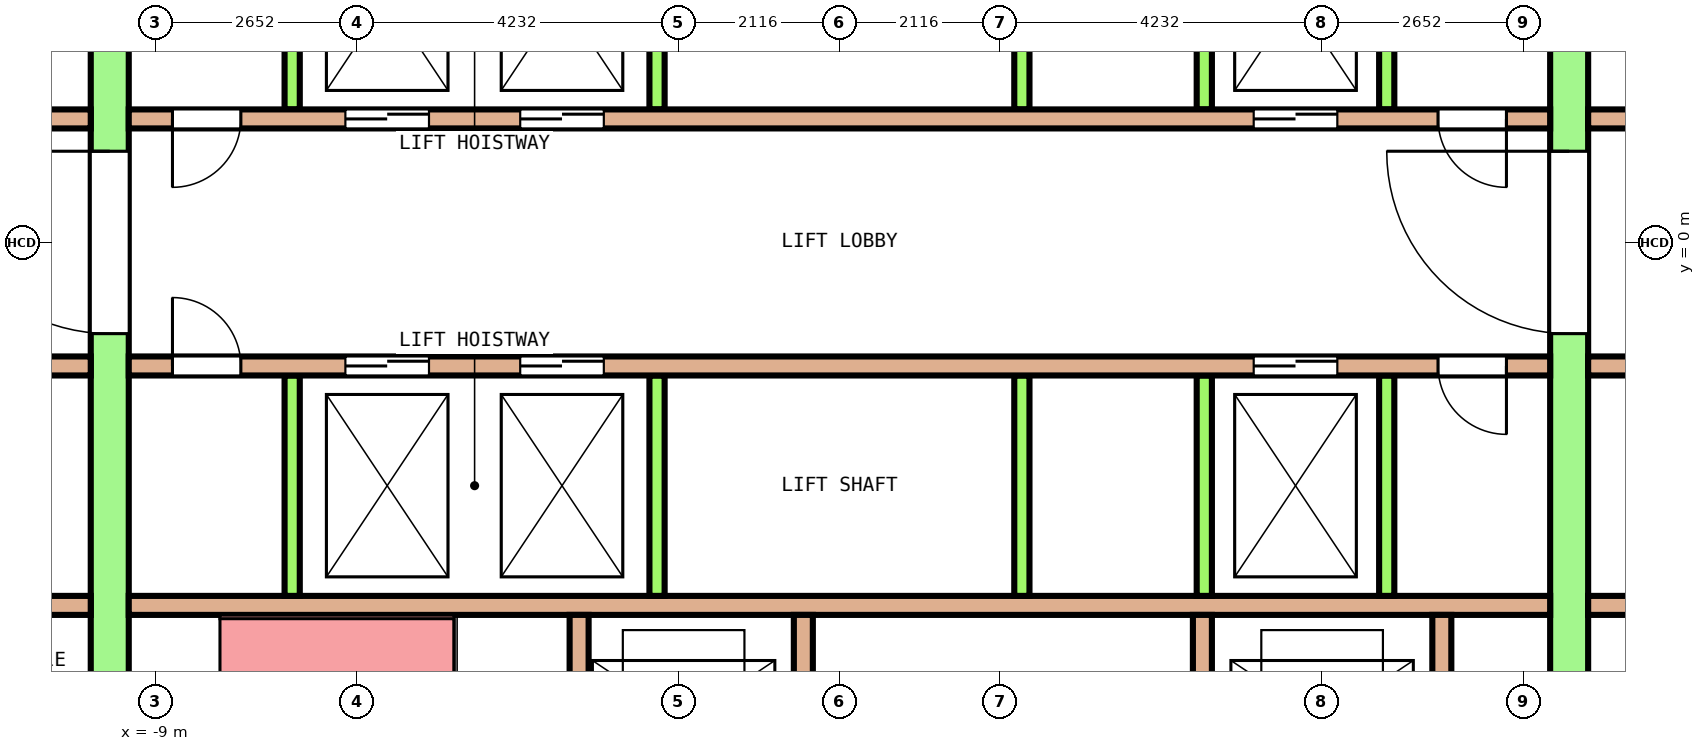
"""IFC4 building model, lengths in metres.
Left out: names, types, materials, properties, quantities, classifications, styles, units other than length and angle.
Written with IfcOpenShell. Run it as: python <this file> out.ifc"""

import sys

from ifc_helpers import new_model, si_unit, direction, frame, frame_2d, origin, place, context, subcontext, project, spatial, rectangle, extrude, element, fill, save


model = new_model("IFC4")
c1 = context("Model", 3, precision=1e-05, world=origin(), true_north=direction((0.0, 1.0)))
c2 = subcontext(c1, "Body", "Model", "MODEL_VIEW")
j1 = project(units=[si_unit("LENGTHUNIT", "METRE"), si_unit("PLANEANGLEUNIT", "RADIAN")], contexts=[c1])
p1 = place(None, origin())
s1 = spatial("IfcSite", under=j1, at=p1, CompositionType="ELEMENT")
p2 = place(p1, origin())
s2 = spatial("IfcBuilding", under=s1, at=p2, CompositionType="ELEMENT")
p3 = place(p2, frame((0.0, 0.0, 135.2)))
s3 = spatial("IfcBuildingStorey", under=s2, at=p3, CompositionType="ELEMENT", Elevation=135.2)
p4 = place(p3, frame((-9.6, -7.7, 0.0), z_axis=(0.0, 0.0, 1.0), x_axis=(0.0, 1.0, 0.0)))
e1 = element("IfcWall", 1, at=p4, inside=s3, PredefinedType="SHEAR", context=c2, shape_type="SweptSolid", body=[
    extrude(rectangle(XDim=15.4, YDim=0.5, at=frame_2d((7.7, 0.0))), origin(), (0.0, 0.0, 1.0), 4.1),
])
p5 = place(p4, frame((6.5, 0.0, 0.0)))
e2 = element("IfcOpeningElement", 2, at=p5, cuts=e1, PredefinedType="OPENING", context=c2, shape_type="SweptSolid", body=[
    extrude(rectangle(XDim=2.4, YDim=2.1, at=frame_2d((1.2, 1.05))), frame((0.0, 0.26, 0.0), z_axis=(0.0, -1.0, 0.0), x_axis=(1.0, 0.0, 0.0)), (0.0, 0.0, 1.0), 0.52),
])
p6 = place(p4, frame((13.4, 0.0, 0.0)))
e3 = element("IfcOpeningElement", 3, at=p6, cuts=e1, PredefinedType="OPENING", context=c2, shape_type="SweptSolid", body=[
    extrude(rectangle(XDim=1.2, YDim=2.1, at=frame_2d((0.6, 1.05))), frame((0.0, 0.26, 0.0), z_axis=(0.0, -1.0, 0.0), x_axis=(1.0, 0.0, 0.0)), (0.0, 0.0, 1.0), 0.52),
])
p7 = place(p4, frame((0.8, 0.0, 0.0)))
e4 = element("IfcOpeningElement", 4, at=p7, cuts=e1, PredefinedType="OPENING", context=c2, shape_type="SweptSolid", body=[
    extrude(rectangle(XDim=1.2, YDim=2.1, at=frame_2d((0.6, 1.05))), frame((0.0, 0.26, 0.0), z_axis=(0.0, -1.0, 0.0), x_axis=(1.0, 0.0, 0.0)), (0.0, 0.0, 1.0), 0.52),
])
p8 = place(p3, frame((9.6, -7.7, 0.0), z_axis=(0.0, 0.0, 1.0), x_axis=(0.0, 1.0, 0.0)))
e5 = element("IfcWall", 5, at=p8, inside=s3, PredefinedType="SHEAR", context=c2, shape_type="SweptSolid", body=[
    extrude(rectangle(XDim=15.4, YDim=0.5, at=frame_2d((7.7, 0.0))), origin(), (0.0, 0.0, 1.0), 4.1),
])
p9 = place(p8, frame((6.5, 0.0, 0.0)))
e6 = element("IfcOpeningElement", 6, at=p9, cuts=e5, PredefinedType="OPENING", context=c2, shape_type="SweptSolid", body=[
    extrude(rectangle(XDim=2.4, YDim=2.1, at=frame_2d((1.2, 1.05))), frame((0.0, 0.26, 0.0), z_axis=(0.0, -1.0, 0.0), x_axis=(1.0, 0.0, 0.0)), (0.0, 0.0, 1.0), 0.52),
])
p10 = place(p8, frame((13.4, 0.0, 0.0)))
e7 = element("IfcOpeningElement", 7, at=p10, cuts=e5, PredefinedType="OPENING", context=c2, shape_type="SweptSolid", body=[
    extrude(rectangle(XDim=1.2, YDim=2.1, at=frame_2d((0.6, 1.05))), frame((0.0, 0.26, 0.0), z_axis=(0.0, -1.0, 0.0), x_axis=(1.0, 0.0, 0.0)), (0.0, 0.0, 1.0), 0.52),
])
p11 = place(p8, frame((0.9, 0.0, 0.0)))
e8 = element("IfcOpeningElement", 8, at=p11, cuts=e5, PredefinedType="OPENING", context=c2, shape_type="SweptSolid", body=[
    extrude(rectangle(XDim=1.0, YDim=2.1, at=frame_2d((0.5, 1.05))), frame((0.0, 0.26, 0.0), z_axis=(0.0, -1.0, 0.0), x_axis=(1.0, 0.0, 0.0)), (0.0, 0.0, 1.0), 0.52),
])
p12 = place(p3, frame((-12.8, 1.625, 0.0), z_axis=(0.0, 0.0, 1.0), x_axis=(1.0, 0.0, 0.0)))
e9 = element("IfcWall", 9, at=p12, inside=s3, PredefinedType="SOLIDWALL", context=c2, shape_type="SweptSolid", body=[
    extrude(rectangle(XDim=2.95, YDim=0.25, at=frame_2d((1.475, 0.0))), origin(), (0.0, 0.0, 1.0), 4.1),
])
p13 = place(p12, frame((1.025, 0.0, 0.0)))
e10 = element("IfcOpeningElement", 10, at=p13, cuts=e9, PredefinedType="OPENING", context=c2, shape_type="SweptSolid", body=[
    extrude(rectangle(XDim=0.9, YDim=2.1, at=frame_2d((0.45, 1.05))), frame((0.0, 0.135, 0.0), z_axis=(0.0, -1.0, 0.0), x_axis=(1.0, 0.0, 0.0)), (0.0, 0.0, 1.0), 0.27),
])
p14 = place(p3, frame((-9.35, 1.625, 0.0), z_axis=(0.0, 0.0, 1.0), x_axis=(1.0, 0.0, 0.0)))
e11 = element("IfcWall", 11, at=p14, inside=s3, PredefinedType="SOLIDWALL", context=c2, shape_type="SweptSolid", body=[
    extrude(rectangle(XDim=18.7, YDim=0.25, at=frame_2d((9.35, 0.0))), origin(), (0.0, 0.0, 1.0), 4.1),
])
p15 = place(p14, frame((2.85, 0.0, 0.0)))
e12 = element("IfcOpeningElement", 12, at=p15, cuts=e11, PredefinedType="OPENING", context=c2, shape_type="SweptSolid", body=[
    extrude(rectangle(XDim=1.1, YDim=2.1, at=frame_2d((0.55, 1.05))), frame((0.0, 0.135, 0.0), z_axis=(0.0, -1.0, 0.0), x_axis=(1.0, 0.0, 0.0)), (0.0, 0.0, 1.0), 0.27),
])
p16 = place(p14, frame((5.15, 0.0, 0.0)))
e13 = element("IfcOpeningElement", 13, at=p16, cuts=e11, PredefinedType="OPENING", context=c2, shape_type="SweptSolid", body=[
    extrude(rectangle(XDim=1.1, YDim=2.1, at=frame_2d((0.55, 1.05))), frame((0.0, 0.135, 0.0), z_axis=(0.0, -1.0, 0.0), x_axis=(1.0, 0.0, 0.0)), (0.0, 0.0, 1.0), 0.27),
])
p17 = place(p14, frame((14.8, 0.0, 0.0)))
e14 = element("IfcOpeningElement", 14, at=p17, cuts=e11, PredefinedType="OPENING", context=c2, shape_type="SweptSolid", body=[
    extrude(rectangle(XDim=1.1, YDim=2.1, at=frame_2d((0.55, 1.05))), frame((0.0, 0.135, 0.0), z_axis=(0.0, -1.0, 0.0), x_axis=(1.0, 0.0, 0.0)), (0.0, 0.0, 1.0), 0.27),
])
p18 = place(p14, frame((0.575, 0.0, 0.0)))
e15 = element("IfcOpeningElement", 15, at=p18, cuts=e11, PredefinedType="OPENING", context=c2, shape_type="SweptSolid", body=[
    extrude(rectangle(XDim=0.9, YDim=2.1, at=frame_2d((0.45, 1.05))), frame((0.0, 0.135, 0.0), z_axis=(0.0, -1.0, 0.0), x_axis=(1.0, 0.0, 0.0)), (0.0, 0.0, 1.0), 0.27),
])
p19 = place(p14, frame((17.225, 0.0, 0.0)))
e16 = element("IfcOpeningElement", 16, at=p19, cuts=e11, PredefinedType="OPENING", context=c2, shape_type="SweptSolid", body=[
    extrude(rectangle(XDim=0.9, YDim=2.1, at=frame_2d((0.45, 1.05))), frame((0.0, 0.135, 0.0), z_axis=(0.0, -1.0, 0.0), x_axis=(1.0, 0.0, 0.0)), (0.0, 0.0, 1.0), 0.27),
])
p20 = place(p3, frame((9.85, 1.625, 0.0), z_axis=(0.0, 0.0, 1.0), x_axis=(1.0, 0.0, 0.0)))
e17 = element("IfcWall", 17, at=p20, inside=s3, PredefinedType="SOLIDWALL", context=c2, shape_type="SweptSolid", body=[
    extrude(rectangle(XDim=2.95, YDim=0.25, at=frame_2d((1.475, 0.0))), origin(), (0.0, 0.0, 1.0), 4.1),
])
p21 = place(p20, frame((1.025, 0.0, 0.0)))
e18 = element("IfcOpeningElement", 18, at=p21, cuts=e17, PredefinedType="OPENING", context=c2, shape_type="SweptSolid", body=[
    extrude(rectangle(XDim=0.9, YDim=2.1, at=frame_2d((0.45, 1.05))), frame((0.0, 0.135, 0.0), z_axis=(0.0, -1.0, 0.0), x_axis=(1.0, 0.0, 0.0)), (0.0, 0.0, 1.0), 0.27),
])
for number, where, z_axis, x_axis in (
    (19, (-7.2, 1.75, 0.0), (0.0, 0.0, 1.0), (0.0, 1.0, 0.0)),
    (20, (-2.4, 1.75, 0.0), (0.0, 0.0, 1.0), (0.0, 1.0, 0.0)),
    (21, (2.4, 1.75, 0.0), (0.0, 0.0, 1.0), (0.0, 1.0, 0.0)),
    (22, (4.8, 1.75, 0.0), (0.0, 0.0, 1.0), (0.0, 1.0, 0.0)),
    (23, (7.2, 1.75, 0.0), (0.0, 0.0, 1.0), (0.0, 1.0, 0.0)),
):
    element("IfcWall", number, at=place(p3, frame(where, z_axis=z_axis, x_axis=x_axis)), inside=s3, PredefinedType="SOLIDWALL", context=c2, shape_type="SweptSolid", body=[
        extrude(rectangle(XDim=2.9, YDim=0.2, at=frame_2d((1.45, 0.0))), origin(), (0.0, 0.0, 1.0), 4.1),
    ])
p22 = place(p3, frame((-12.8, -1.625, 0.0), z_axis=(0.0, 0.0, 1.0), x_axis=(1.0, 0.0, 0.0)))
e24 = element("IfcWall", 24, at=p22, inside=s3, PredefinedType="SOLIDWALL", context=c2, shape_type="SweptSolid", body=[
    extrude(rectangle(XDim=2.95, YDim=0.25, at=frame_2d((1.475, 0.0))), origin(), (0.0, 0.0, 1.0), 4.1),
])
p23 = place(p22, frame((1.025, 0.0, 0.0)))
e25 = element("IfcOpeningElement", 25, at=p23, cuts=e24, PredefinedType="OPENING", context=c2, shape_type="SweptSolid", body=[
    extrude(rectangle(XDim=0.9, YDim=2.1, at=frame_2d((0.45, 1.05))), frame((0.0, 0.135, 0.0), z_axis=(0.0, -1.0, 0.0), x_axis=(1.0, 0.0, 0.0)), (0.0, 0.0, 1.0), 0.27),
])
p24 = place(p3, frame((-9.35, -1.625, 0.0), z_axis=(0.0, 0.0, 1.0), x_axis=(1.0, 0.0, 0.0)))
e26 = element("IfcWall", 26, at=p24, inside=s3, PredefinedType="SOLIDWALL", context=c2, shape_type="SweptSolid", body=[
    extrude(rectangle(XDim=18.7, YDim=0.25, at=frame_2d((9.35, 0.0))), origin(), (0.0, 0.0, 1.0), 4.1),
])
p25 = place(p24, frame((2.85, 0.0, 0.0)))
e27 = element("IfcOpeningElement", 27, at=p25, cuts=e26, PredefinedType="OPENING", context=c2, shape_type="SweptSolid", body=[
    extrude(rectangle(XDim=1.1, YDim=2.1, at=frame_2d((0.55, 1.05))), frame((0.0, 0.135, 0.0), z_axis=(0.0, -1.0, 0.0), x_axis=(1.0, 0.0, 0.0)), (0.0, 0.0, 1.0), 0.27),
])
p26 = place(p24, frame((5.15, 0.0, 0.0)))
e28 = element("IfcOpeningElement", 28, at=p26, cuts=e26, PredefinedType="OPENING", context=c2, shape_type="SweptSolid", body=[
    extrude(rectangle(XDim=1.1, YDim=2.1, at=frame_2d((0.55, 1.05))), frame((0.0, 0.135, 0.0), z_axis=(0.0, -1.0, 0.0), x_axis=(1.0, 0.0, 0.0)), (0.0, 0.0, 1.0), 0.27),
])
p27 = place(p24, frame((14.8, 0.0, 0.0)))
e29 = element("IfcOpeningElement", 29, at=p27, cuts=e26, PredefinedType="OPENING", context=c2, shape_type="SweptSolid", body=[
    extrude(rectangle(XDim=1.1, YDim=2.1, at=frame_2d((0.55, 1.05))), frame((0.0, 0.135, 0.0), z_axis=(0.0, -1.0, 0.0), x_axis=(1.0, 0.0, 0.0)), (0.0, 0.0, 1.0), 0.27),
])
p28 = place(p24, frame((0.575, 0.0, 0.0)))
e30 = element("IfcOpeningElement", 30, at=p28, cuts=e26, PredefinedType="OPENING", context=c2, shape_type="SweptSolid", body=[
    extrude(rectangle(XDim=0.9, YDim=2.1, at=frame_2d((0.45, 1.05))), frame((0.0, 0.135, 0.0), z_axis=(0.0, -1.0, 0.0), x_axis=(1.0, 0.0, 0.0)), (0.0, 0.0, 1.0), 0.27),
])
p29 = place(p24, frame((17.225, 0.0, 0.0)))
e31 = element("IfcOpeningElement", 31, at=p29, cuts=e26, PredefinedType="OPENING", context=c2, shape_type="SweptSolid", body=[
    extrude(rectangle(XDim=0.9, YDim=2.1, at=frame_2d((0.45, 1.05))), frame((0.0, 0.135, 0.0), z_axis=(0.0, -1.0, 0.0), x_axis=(1.0, 0.0, 0.0)), (0.0, 0.0, 1.0), 0.27),
])
p30 = place(p3, frame((9.85, -1.625, 0.0), z_axis=(0.0, 0.0, 1.0), x_axis=(1.0, 0.0, 0.0)))
e32 = element("IfcWall", 32, at=p30, inside=s3, PredefinedType="SOLIDWALL", context=c2, shape_type="SweptSolid", body=[
    extrude(rectangle(XDim=2.95, YDim=0.25, at=frame_2d((1.475, 0.0))), origin(), (0.0, 0.0, 1.0), 4.1),
])
p31 = place(p30, frame((1.025, 0.0, 0.0)))
e33 = element("IfcOpeningElement", 33, at=p31, cuts=e32, PredefinedType="OPENING", context=c2, shape_type="SweptSolid", body=[
    extrude(rectangle(XDim=0.9, YDim=2.1, at=frame_2d((0.45, 1.05))), frame((0.0, 0.135, 0.0), z_axis=(0.0, -1.0, 0.0), x_axis=(1.0, 0.0, 0.0)), (0.0, 0.0, 1.0), 0.27),
])
p32 = place(p3, frame((-12.8, -4.775, 0.0), z_axis=(0.0, 0.0, 1.0), x_axis=(1.0, 0.0, 0.0)))
e34 = element("IfcWall", 34, at=p32, inside=s3, PredefinedType="SOLIDWALL", context=c2, shape_type="SweptSolid", body=[
    extrude(rectangle(XDim=2.95, YDim=0.25, at=frame_2d((1.475, 0.0))), origin(), (0.0, 0.0, 1.0), 4.1),
])
p33 = place(p3, frame((-9.35, -4.775, 0.0), z_axis=(0.0, 0.0, 1.0), x_axis=(1.0, 0.0, 0.0)))
e35 = element("IfcWall", 35, at=p33, inside=s3, PredefinedType="SOLIDWALL", context=c2, shape_type="SweptSolid", body=[
    extrude(rectangle(XDim=18.7, YDim=0.25, at=frame_2d((9.35, 0.0))), origin(), (0.0, 0.0, 1.0), 4.1),
])
p34 = place(p3, frame((9.85, -4.775, 0.0), z_axis=(0.0, 0.0, 1.0), x_axis=(1.0, 0.0, 0.0)))
e36 = element("IfcWall", 36, at=p34, inside=s3, PredefinedType="SOLIDWALL", context=c2, shape_type="SweptSolid", body=[
    extrude(rectangle(XDim=2.95, YDim=0.25, at=frame_2d((1.475, 0.0))), origin(), (0.0, 0.0, 1.0), 4.1),
])
for number, where, z_axis, x_axis in (
    (37, (-7.2, -4.65, 0.0), (0.0, 0.0, 1.0), (0.0, 1.0, 0.0)),
    (38, (-2.4, -4.65, 0.0), (0.0, 0.0, 1.0), (0.0, 1.0, 0.0)),
    (39, (2.4, -4.65, 0.0), (0.0, 0.0, 1.0), (0.0, 1.0, 0.0)),
    (40, (4.8, -4.65, 0.0), (0.0, 0.0, 1.0), (0.0, 1.0, 0.0)),
    (41, (7.2, -4.65, 0.0), (0.0, 0.0, 1.0), (0.0, 1.0, 0.0)),
):
    element("IfcWall", number, at=place(p3, frame(where, z_axis=z_axis, x_axis=x_axis)), inside=s3, PredefinedType="SOLIDWALL", context=c2, shape_type="SweptSolid", body=[
        extrude(rectangle(XDim=2.9, YDim=0.2, at=frame_2d((1.45, 0.0))), origin(), (0.0, 0.0, 1.0), 4.1),
    ])
p35 = place(p3, frame((-3.425, -7.7, 0.0), z_axis=(0.0, 0.0, 1.0), x_axis=(0.0, 1.0, 0.0)))
e42 = element("IfcWall", 42, at=p35, inside=s3, PredefinedType="SOLIDWALL", context=c2, shape_type="SweptSolid", body=[
    extrude(rectangle(XDim=2.8, YDim=0.25, at=frame_2d((1.4, 0.0))), origin(), (0.0, 0.0, 1.0), 4.1),
])
p36 = place(p3, frame((-0.475, -7.7, 0.0), z_axis=(0.0, 0.0, 1.0), x_axis=(0.0, 1.0, 0.0)))
e43 = element("IfcWall", 43, at=p36, inside=s3, PredefinedType="SOLIDWALL", context=c2, shape_type="SweptSolid", body=[
    extrude(rectangle(XDim=2.8, YDim=0.25, at=frame_2d((1.4, 0.0))), origin(), (0.0, 0.0, 1.0), 4.1),
])
p37 = place(p36, frame((0.85, 0.0, 0.0)))
e44 = element("IfcOpeningElement", 44, at=p37, cuts=e43, PredefinedType="OPENING", context=c2, shape_type="SweptSolid", body=[
    extrude(rectangle(XDim=1.1, YDim=2.1, at=frame_2d((0.55, 1.05))), frame((0.0, 0.135, 0.0), z_axis=(0.0, -1.0, 0.0), x_axis=(1.0, 0.0, 0.0)), (0.0, 0.0, 1.0), 0.27),
])
p38 = place(p3, frame((4.775, -7.7, 0.0), z_axis=(0.0, 0.0, 1.0), x_axis=(0.0, 1.0, 0.0)))
e45 = element("IfcWall", 45, at=p38, inside=s3, PredefinedType="SOLIDWALL", context=c2, shape_type="SweptSolid", body=[
    extrude(rectangle(XDim=2.8, YDim=0.25, at=frame_2d((1.4, 0.0))), origin(), (0.0, 0.0, 1.0), 4.1),
])
p39 = place(p38, frame((0.85, 0.0, 0.0)))
e46 = element("IfcOpeningElement", 46, at=p39, cuts=e45, PredefinedType="OPENING", context=c2, shape_type="SweptSolid", body=[
    extrude(rectangle(XDim=1.1, YDim=2.1, at=frame_2d((0.55, 1.05))), frame((0.0, 0.135, 0.0), z_axis=(0.0, -1.0, 0.0), x_axis=(1.0, 0.0, 0.0)), (0.0, 0.0, 1.0), 0.27),
])
p40 = place(p3, frame((7.925, -7.7, 0.0), z_axis=(0.0, 0.0, 1.0), x_axis=(0.0, 1.0, 0.0)))
e47 = element("IfcWall", 47, at=p40, inside=s3, PredefinedType="SOLIDWALL", context=c2, shape_type="SweptSolid", body=[
    extrude(rectangle(XDim=2.8, YDim=0.25, at=frame_2d((1.4, 0.0))), origin(), (0.0, 0.0, 1.0), 4.1),
])
p41 = place(p15, origin())
e48 = element("IfcDoor", 48, at=p41, inside=s3, OperationType="DOUBLE_DOOR_SLIDING", PredefinedType="DOOR", context=c2, shape_type="SweptSolid", body=[
    extrude(rectangle(XDim=1.1, YDim=2.1, at=frame_2d((0.55, 1.05))), frame((0.0, 0.075, 0.0), z_axis=(0.0, -1.0, 0.0), x_axis=(1.0, 0.0, 0.0)), (0.0, 0.0, 1.0), 0.15),
])
fill(e12, e48)
p42 = place(p16, origin())
e49 = element("IfcDoor", 49, at=p42, inside=s3, OperationType="DOUBLE_DOOR_SLIDING", PredefinedType="DOOR", context=c2, shape_type="SweptSolid", body=[
    extrude(rectangle(XDim=1.1, YDim=2.1, at=frame_2d((0.55, 1.05))), frame((0.0, 0.075, 0.0), z_axis=(0.0, -1.0, 0.0), x_axis=(1.0, 0.0, 0.0)), (0.0, 0.0, 1.0), 0.15),
])
fill(e13, e49)
p43 = place(p17, origin())
e50 = element("IfcDoor", 50, at=p43, inside=s3, OperationType="DOUBLE_DOOR_SLIDING", PredefinedType="DOOR", context=c2, shape_type="SweptSolid", body=[
    extrude(rectangle(XDim=1.1, YDim=2.1, at=frame_2d((0.55, 1.05))), frame((0.0, 0.075, 0.0), z_axis=(0.0, -1.0, 0.0), x_axis=(1.0, 0.0, 0.0)), (0.0, 0.0, 1.0), 0.15),
])
fill(e14, e50)
p44 = place(p25, origin())
e51 = element("IfcDoor", 51, at=p44, inside=s3, OperationType="DOUBLE_DOOR_SLIDING", PredefinedType="DOOR", context=c2, shape_type="SweptSolid", body=[
    extrude(rectangle(XDim=1.1, YDim=2.1, at=frame_2d((0.55, 1.05))), frame((0.0, 0.075, 0.0), z_axis=(0.0, -1.0, 0.0), x_axis=(1.0, 0.0, 0.0)), (0.0, 0.0, 1.0), 0.15),
])
fill(e27, e51)
p45 = place(p26, origin())
e52 = element("IfcDoor", 52, at=p45, inside=s3, OperationType="DOUBLE_DOOR_SLIDING", PredefinedType="DOOR", context=c2, shape_type="SweptSolid", body=[
    extrude(rectangle(XDim=1.1, YDim=2.1, at=frame_2d((0.55, 1.05))), frame((0.0, 0.075, 0.0), z_axis=(0.0, -1.0, 0.0), x_axis=(1.0, 0.0, 0.0)), (0.0, 0.0, 1.0), 0.15),
])
fill(e28, e52)
p46 = place(p27, origin())
e53 = element("IfcDoor", 53, at=p46, inside=s3, OperationType="DOUBLE_DOOR_SLIDING", PredefinedType="DOOR", context=c2, shape_type="SweptSolid", body=[
    extrude(rectangle(XDim=1.1, YDim=2.1, at=frame_2d((0.55, 1.05))), frame((0.0, 0.075, 0.0), z_axis=(0.0, -1.0, 0.0), x_axis=(1.0, 0.0, 0.0)), (0.0, 0.0, 1.0), 0.15),
])
fill(e29, e53)
p47 = place(p5, origin())
e54 = element("IfcDoor", 54, at=p47, inside=s3, OperationType="DOUBLE_DOOR_SINGLE_SWING", PredefinedType="DOOR", context=c2, shape_type="SweptSolid", body=[
    extrude(rectangle(XDim=2.4, YDim=2.1, at=frame_2d((1.2, 1.05))), frame((0.0, 0.2, 0.0), z_axis=(0.0, -1.0, 0.0), x_axis=(1.0, 0.0, 0.0)), (0.0, 0.0, 1.0), 0.4),
])
fill(e2, e54)
p48 = place(p9, origin())
e55 = element("IfcDoor", 55, at=p48, inside=s3, OperationType="DOUBLE_DOOR_SINGLE_SWING", PredefinedType="DOOR", context=c2, shape_type="SweptSolid", body=[
    extrude(rectangle(XDim=2.4, YDim=2.1, at=frame_2d((1.2, 1.05))), frame((0.0, 0.2, 0.0), z_axis=(0.0, -1.0, 0.0), x_axis=(1.0, 0.0, 0.0)), (0.0, 0.0, 1.0), 0.4),
])
fill(e6, e55)
p49 = place(p18, origin())
e56 = element("IfcDoor", 56, at=p49, inside=s3, OperationType="SINGLE_SWING_LEFT", PredefinedType="DOOR", context=c2, shape_type="SweptSolid", body=[
    extrude(rectangle(XDim=0.9, YDim=2.1, at=frame_2d((0.45, 1.05))), frame((0.0, 0.075, 0.0), z_axis=(0.0, -1.0, 0.0), x_axis=(1.0, 0.0, 0.0)), (0.0, 0.0, 1.0), 0.15),
])
fill(e15, e56)
p50 = place(p19, origin())
e57 = element("IfcDoor", 57, at=p50, inside=s3, OperationType="SINGLE_SWING_RIGHT", PredefinedType="DOOR", context=c2, shape_type="SweptSolid", body=[
    extrude(rectangle(XDim=0.9, YDim=2.1, at=frame_2d((0.45, 1.05))), frame((0.0, 0.075, 0.0), z_axis=(0.0, -1.0, 0.0), x_axis=(1.0, 0.0, 0.0)), (0.0, 0.0, 1.0), 0.15),
])
fill(e16, e57)
p51 = place(p28, origin())
e58 = element("IfcDoor", 58, at=p51, inside=s3, OperationType="SINGLE_SWING_LEFT", PredefinedType="DOOR", context=c2, shape_type="SweptSolid", body=[
    extrude(rectangle(XDim=0.9, YDim=2.1, at=frame_2d((0.45, 1.05))), frame((0.0, 0.075, 0.0), z_axis=(0.0, -1.0, 0.0), x_axis=(1.0, 0.0, 0.0)), (0.0, 0.0, 1.0), 0.15),
])
fill(e30, e58)
p52 = place(p29, origin())
e59 = element("IfcDoor", 59, at=p52, inside=s3, OperationType="SINGLE_SWING_RIGHT", PredefinedType="DOOR", context=c2, shape_type="SweptSolid", body=[
    extrude(rectangle(XDim=0.9, YDim=2.1, at=frame_2d((0.45, 1.05))), frame((0.0, 0.075, 0.0), z_axis=(0.0, -1.0, 0.0), x_axis=(1.0, 0.0, 0.0)), (0.0, 0.0, 1.0), 0.15),
])
fill(e31, e59)
save(model, sys.argv[1])
